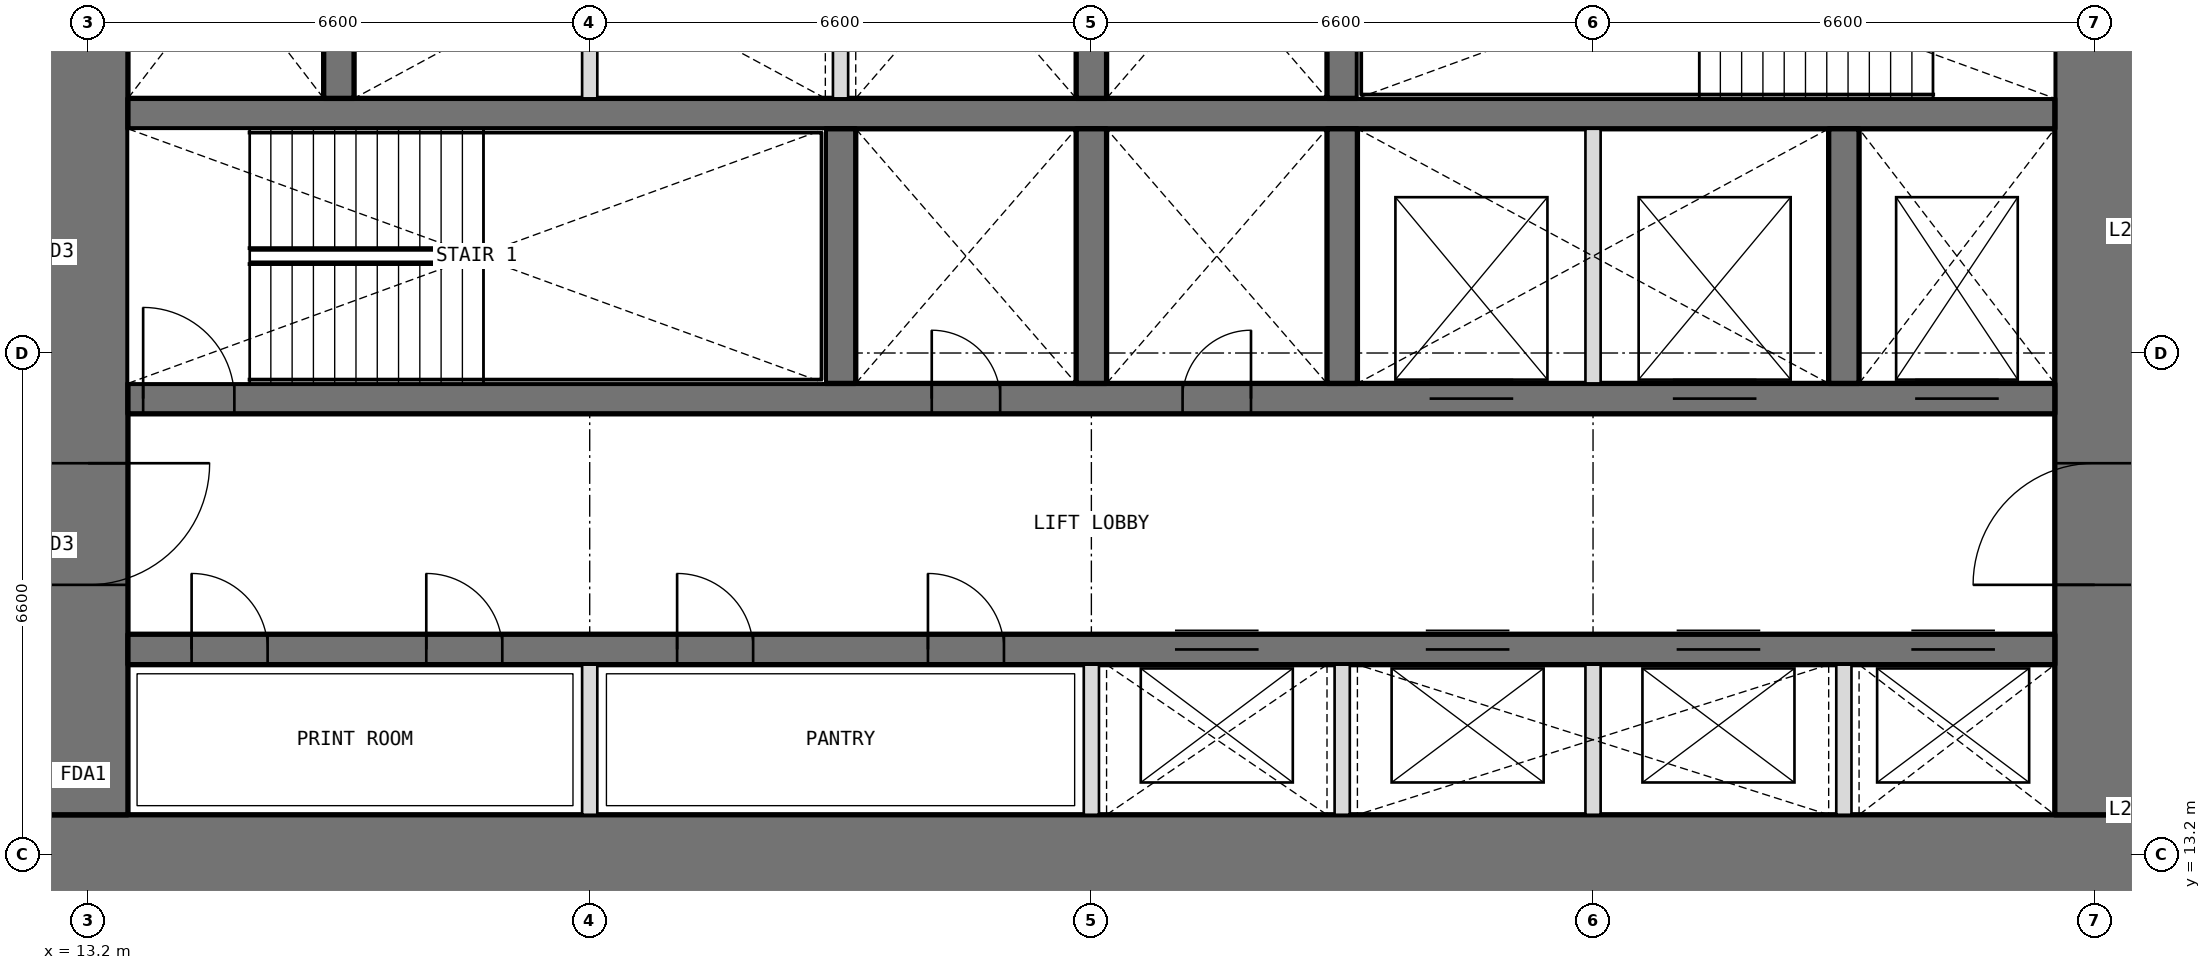
"""IFC4 building model, lengths in metres.
Left out: names, types, materials, properties, quantities, classifications, styles, units other than length and angle.
Written with IfcOpenShell. Run it as: python <this file> out.ifc"""

import sys

from ifc_helpers import new_model, si_unit, direction, frame, frame_2d, origin, place, context, subcontext, project, spatial, rectangle, extrude, element, fill, save


model = new_model("IFC4")
c1 = context("Model", 3, precision=1e-05, world=origin(), true_north=direction((0.0, 1.0)))
c2 = subcontext(c1, "Body", "Model", "MODEL_VIEW")
j1 = project(units=[si_unit("LENGTHUNIT", "METRE"), si_unit("PLANEANGLEUNIT", "RADIAN")], contexts=[c1])
p1 = place(None, origin())
s1 = spatial("IfcSite", under=j1, at=p1, CompositionType="ELEMENT")
p2 = place(p1, origin())
s2 = spatial("IfcBuilding", under=s1, at=p2, CompositionType="ELEMENT")
p3 = place(p2, frame((0.0, 0.0, 94.8)))
s3 = spatial("IfcBuildingStorey", under=s2, at=p3, CompositionType="ELEMENT", Elevation=94.8)
p4 = place(p3, frame((12.675, 13.2, 0.0), z_axis=(0.0, 0.0, 1.0), x_axis=(1.0, 0.0, 0.0)))
e1 = element("IfcWall", 1, at=p4, inside=s3, PredefinedType="SHEAR", context=c2, shape_type="SweptSolid", body=[
    extrude(rectangle(XDim=27.45, YDim=1.05, at=frame_2d((13.725, 0.0))), origin(), (0.0, 0.0, 1.0), 4.2),
])
p5 = place(p3, frame((39.6, 13.725, 0.0), z_axis=(0.0, 0.0, 1.0), x_axis=(0.0, 1.0, 0.0)))
e2 = element("IfcWall", 2, at=p5, inside=s3, PredefinedType="SHEAR", context=c2, shape_type="SweptSolid", body=[
    extrude(rectangle(XDim=18.75, YDim=1.05, at=frame_2d((9.375, 0.0))), origin(), (0.0, 0.0, 1.0), 4.2),
])
p6 = place(p5, frame((3.025, 0.0, 0.0)))
e3 = element("IfcOpeningElement", 3, at=p6, cuts=e2, PredefinedType="OPENING", context=c2, shape_type="SweptSolid", body=[
    extrude(rectangle(XDim=1.6, YDim=2.1, at=frame_2d((0.8, 1.05))), frame((0.0, 0.535, 0.0), z_axis=(0.0, -1.0, 0.0), x_axis=(1.0, 0.0, 0.0)), (0.0, 0.0, 1.0), 1.07),
])
p7 = place(p5, frame((13.825, 0.0, 0.0)))
e4 = element("IfcOpeningElement", 4, at=p7, cuts=e2, PredefinedType="OPENING", context=c2, shape_type="SweptSolid", body=[
    extrude(rectangle(XDim=1.6, YDim=2.1, at=frame_2d((0.8, 1.05))), frame((0.0, 0.535, 0.0), z_axis=(0.0, -1.0, 0.0), x_axis=(1.0, 0.0, 0.0)), (0.0, 0.0, 1.0), 1.07),
])
p8 = place(p3, frame((13.2, 32.475, 0.0), z_axis=(0.0, 0.0, 1.0), x_axis=(0.0, -1.0, 0.0)))
e5 = element("IfcWall", 5, at=p8, inside=s3, PredefinedType="SHEAR", context=c2, shape_type="SweptSolid", body=[
    extrude(rectangle(XDim=18.75, YDim=1.05, at=frame_2d((9.375, 0.0))), origin(), (0.0, 0.0, 1.0), 4.2),
])
p9 = place(p8, frame((14.125, 0.0, 0.0)))
e6 = element("IfcOpeningElement", 6, at=p9, cuts=e5, PredefinedType="OPENING", context=c2, shape_type="SweptSolid", body=[
    extrude(rectangle(XDim=1.6, YDim=2.1, at=frame_2d((0.8, 1.05))), frame((0.0, 0.535, 0.0), z_axis=(0.0, -1.0, 0.0), x_axis=(1.0, 0.0, 0.0)), (0.0, 0.0, 1.0), 1.07),
])
p10 = place(p8, frame((3.325, 0.0, 0.0)))
e7 = element("IfcOpeningElement", 7, at=p10, cuts=e5, PredefinedType="OPENING", context=c2, shape_type="SweptSolid", body=[
    extrude(rectangle(XDim=1.6, YDim=2.1, at=frame_2d((0.8, 1.05))), frame((0.0, 0.535, 0.0), z_axis=(0.0, -1.0, 0.0), x_axis=(1.0, 0.0, 0.0)), (0.0, 0.0, 1.0), 1.07),
])
p11 = place(p3, frame((13.725, 15.9, 0.0), z_axis=(0.0, 0.0, 1.0), x_axis=(1.0, 0.0, 0.0)))
e8 = element("IfcWall", 8, at=p11, inside=s3, PredefinedType="SHEAR", context=c2, shape_type="SweptSolid", body=[
    extrude(rectangle(XDim=25.35, YDim=0.4, at=frame_2d((12.675, 0.0))), origin(), (0.0, 0.0, 1.0), 4.2),
])
p12 = place(p11, frame((0.837, 0.0, 0.0)))
e9 = element("IfcOpeningElement", 9, at=p12, cuts=e8, PredefinedType="OPENING", context=c2, shape_type="SweptSolid", body=[
    extrude(rectangle(XDim=1.0, YDim=2.1, at=frame_2d((0.5, 1.05))), frame((0.0, 0.21, 0.0), z_axis=(0.0, -1.0, 0.0), x_axis=(1.0, 0.0, 0.0)), (0.0, 0.0, 1.0), 0.42),
])
p13 = place(p11, frame((3.925, 0.0, 0.0)))
e10 = element("IfcOpeningElement", 10, at=p13, cuts=e8, PredefinedType="OPENING", context=c2, shape_type="SweptSolid", body=[
    extrude(rectangle(XDim=1.0, YDim=2.1, at=frame_2d((0.5, 1.05))), frame((0.0, 0.21, 0.0), z_axis=(0.0, -1.0, 0.0), x_axis=(1.0, 0.0, 0.0)), (0.0, 0.0, 1.0), 0.42),
])
p14 = place(p11, frame((7.225, 0.0, 0.0)))
e11 = element("IfcOpeningElement", 11, at=p14, cuts=e8, PredefinedType="OPENING", context=c2, shape_type="SweptSolid", body=[
    extrude(rectangle(XDim=1.0, YDim=2.1, at=frame_2d((0.5, 1.05))), frame((0.0, 0.21, 0.0), z_axis=(0.0, -1.0, 0.0), x_axis=(1.0, 0.0, 0.0)), (0.0, 0.0, 1.0), 0.42),
])
p15 = place(p11, frame((10.525, 0.0, 0.0)))
e12 = element("IfcOpeningElement", 12, at=p15, cuts=e8, PredefinedType="OPENING", context=c2, shape_type="SweptSolid", body=[
    extrude(rectangle(XDim=1.0, YDim=2.1, at=frame_2d((0.5, 1.05))), frame((0.0, 0.21, 0.0), z_axis=(0.0, -1.0, 0.0), x_axis=(1.0, 0.0, 0.0)), (0.0, 0.0, 1.0), 0.42),
])
p16 = place(p11, frame((13.775, 0.0, 0.0)))
e13 = element("IfcOpeningElement", 13, at=p16, cuts=e8, PredefinedType="OPENING", context=c2, shape_type="SweptSolid", body=[
    extrude(rectangle(XDim=1.1, YDim=2.1, at=frame_2d((0.55, 1.05))), frame((0.0, 0.21, 0.0), z_axis=(0.0, -1.0, 0.0), x_axis=(1.0, 0.0, 0.0)), (0.0, 0.0, 1.0), 0.42),
])
p17 = place(p11, frame((17.075, 0.0, 0.0)))
e14 = element("IfcOpeningElement", 14, at=p17, cuts=e8, PredefinedType="OPENING", context=c2, shape_type="SweptSolid", body=[
    extrude(rectangle(XDim=1.1, YDim=2.1, at=frame_2d((0.55, 1.05))), frame((0.0, 0.21, 0.0), z_axis=(0.0, -1.0, 0.0), x_axis=(1.0, 0.0, 0.0)), (0.0, 0.0, 1.0), 0.42),
])
p18 = place(p11, frame((20.375, 0.0, 0.0)))
e15 = element("IfcOpeningElement", 15, at=p18, cuts=e8, PredefinedType="OPENING", context=c2, shape_type="SweptSolid", body=[
    extrude(rectangle(XDim=1.1, YDim=2.1, at=frame_2d((0.55, 1.05))), frame((0.0, 0.21, 0.0), z_axis=(0.0, -1.0, 0.0), x_axis=(1.0, 0.0, 0.0)), (0.0, 0.0, 1.0), 0.42),
])
p19 = place(p11, frame((23.462, 0.0, 0.0)))
e16 = element("IfcOpeningElement", 16, at=p19, cuts=e8, PredefinedType="OPENING", context=c2, shape_type="SweptSolid", body=[
    extrude(rectangle(XDim=1.1, YDim=2.1, at=frame_2d((0.55, 1.05))), frame((0.0, 0.21, 0.0), z_axis=(0.0, -1.0, 0.0), x_axis=(1.0, 0.0, 0.0)), (0.0, 0.0, 1.0), 0.42),
])
p20 = place(p3, frame((13.725, 19.2, 0.0), z_axis=(0.0, 0.0, 1.0), x_axis=(1.0, 0.0, 0.0)))
e17 = element("IfcWall", 17, at=p20, inside=s3, PredefinedType="SHEAR", context=c2, shape_type="SweptSolid", body=[
    extrude(rectangle(XDim=25.35, YDim=0.4, at=frame_2d((12.675, 0.0))), origin(), (0.0, 0.0, 1.0), 4.2),
])
p21 = place(p20, frame((10.575, 0.0, 0.0)))
e18 = element("IfcOpeningElement", 18, at=p21, cuts=e17, PredefinedType="OPENING", context=c2, shape_type="SweptSolid", body=[
    extrude(rectangle(XDim=0.9, YDim=2.1, at=frame_2d((0.45, 1.05))), frame((0.0, 0.21, 0.0), z_axis=(0.0, -1.0, 0.0), x_axis=(1.0, 0.0, 0.0)), (0.0, 0.0, 1.0), 0.42),
])
p22 = place(p20, frame((13.875, 0.0, 0.0)))
e19 = element("IfcOpeningElement", 19, at=p22, cuts=e17, PredefinedType="OPENING", context=c2, shape_type="SweptSolid", body=[
    extrude(rectangle(XDim=0.9, YDim=2.1, at=frame_2d((0.45, 1.05))), frame((0.0, 0.21, 0.0), z_axis=(0.0, -1.0, 0.0), x_axis=(1.0, 0.0, 0.0)), (0.0, 0.0, 1.0), 0.42),
])
p23 = place(p20, frame((0.2, 0.0, 0.0)))
e20 = element("IfcOpeningElement", 20, at=p23, cuts=e17, PredefinedType="OPENING", context=c2, shape_type="SweptSolid", body=[
    extrude(rectangle(XDim=1.2, YDim=2.1, at=frame_2d((0.6, 1.05))), frame((0.0, 0.21, 0.0), z_axis=(0.0, -1.0, 0.0), x_axis=(1.0, 0.0, 0.0)), (0.0, 0.0, 1.0), 0.42),
])
p24 = place(p20, frame((23.512, 0.0, 0.0)))
e21 = element("IfcOpeningElement", 21, at=p24, cuts=e17, PredefinedType="OPENING", context=c2, shape_type="SweptSolid", body=[
    extrude(rectangle(XDim=1.1, YDim=2.1, at=frame_2d((0.55, 1.05))), frame((0.0, 0.21, 0.0), z_axis=(0.0, -1.0, 0.0), x_axis=(1.0, 0.0, 0.0)), (0.0, 0.0, 1.0), 0.42),
])
p25 = place(p20, frame((17.125, 0.0, 0.0)))
e22 = element("IfcOpeningElement", 22, at=p25, cuts=e17, PredefinedType="OPENING", context=c2, shape_type="SweptSolid", body=[
    extrude(rectangle(XDim=1.1, YDim=2.1, at=frame_2d((0.55, 1.05))), frame((0.0, 0.21, 0.0), z_axis=(0.0, -1.0, 0.0), x_axis=(1.0, 0.0, 0.0)), (0.0, 0.0, 1.0), 0.42),
])
p26 = place(p20, frame((20.325, 0.0, 0.0)))
e23 = element("IfcOpeningElement", 23, at=p26, cuts=e17, PredefinedType="OPENING", context=c2, shape_type="SweptSolid", body=[
    extrude(rectangle(XDim=1.1, YDim=2.1, at=frame_2d((0.55, 1.05))), frame((0.0, 0.21, 0.0), z_axis=(0.0, -1.0, 0.0), x_axis=(1.0, 0.0, 0.0)), (0.0, 0.0, 1.0), 0.42),
])
p27 = place(p3, frame((13.725, 22.95, 0.0), z_axis=(0.0, 0.0, 1.0), x_axis=(1.0, 0.0, 0.0)))
e24 = element("IfcWall", 24, at=p27, inside=s3, PredefinedType="SHEAR", context=c2, shape_type="SweptSolid", body=[
    extrude(rectangle(XDim=25.35, YDim=0.4, at=frame_2d((12.675, 0.0))), origin(), (0.0, 0.0, 1.0), 4.2),
])
for number, where, z_axis, x_axis in (
    (25, (23.1, 19.4, 0.0), (0.0, 0.0, 1.0), (0.0, 1.0, 0.0)),
    (26, (26.4, 19.4, 0.0), (0.0, 0.0, 1.0), (0.0, 1.0, 0.0)),
    (27, (29.7, 19.4, 0.0), (0.0, 0.0, 1.0), (0.0, 1.0, 0.0)),
    (28, (36.3, 19.4, 0.0), (0.0, 0.0, 1.0), (0.0, 1.0, 0.0)),
    (29, (16.5, 23.15, 0.0), (0.0, 0.0, 1.0), (0.0, 1.0, 0.0)),
    (30, (26.4, 23.15, 0.0), (0.0, 0.0, 1.0), (0.0, 1.0, 0.0)),
    (31, (29.7, 23.15, 0.0), (0.0, 0.0, 1.0), (0.0, 1.0, 0.0)),
):
    element("IfcWall", number, at=place(p3, frame(where, z_axis=z_axis, x_axis=x_axis)), inside=s3, PredefinedType="SHEAR", context=c2, shape_type="SweptSolid", body=[
        extrude(rectangle(XDim=3.35, YDim=0.4, at=frame_2d((1.675, 0.0))), origin(), (0.0, 0.0, 1.0), 4.2),
    ])
for number, where, z_axis, x_axis in (
    (32, (19.8, 13.725, 0.0), (0.0, 0.0, 1.0), (0.0, 1.0, 0.0)),
    (33, (26.4, 13.725, 0.0), (0.0, 0.0, 1.0), (0.0, 1.0, 0.0)),
    (34, (29.7, 13.725, 0.0), (0.0, 0.0, 1.0), (0.0, 1.0, 0.0)),
    (35, (33.0, 13.725, 0.0), (0.0, 0.0, 1.0), (0.0, 1.0, 0.0)),
    (36, (36.3, 13.725, 0.0), (0.0, 0.0, 1.0), (0.0, 1.0, 0.0)),
):
    element("IfcWall", number, at=place(p3, frame(where, z_axis=z_axis, x_axis=x_axis)), inside=s3, PredefinedType="PARTITIONING", context=c2, shape_type="SweptSolid", body=[
        extrude(rectangle(XDim=1.975, YDim=0.2, at=frame_2d((0.987, 0.0))), origin(), (0.0, 0.0, 1.0), 4.2),
    ])
for number, where, z_axis, x_axis in (
    (37, (33.0, 19.4, 0.0), (0.0, 0.0, 1.0), (0.0, 1.0, 0.0)),
    (38, (19.8, 23.15, 0.0), (0.0, 0.0, 1.0), (0.0, 1.0, 0.0)),
    (39, (23.1, 23.15, 0.0), (0.0, 0.0, 1.0), (0.0, 1.0, 0.0)),
):
    element("IfcWall", number, at=place(p3, frame(where, z_axis=z_axis, x_axis=x_axis)), inside=s3, PredefinedType="PARTITIONING", context=c2, shape_type="SweptSolid", body=[
        extrude(rectangle(XDim=3.35, YDim=0.2, at=frame_2d((1.675, 0.0))), origin(), (0.0, 0.0, 1.0), 4.2),
    ])
p28 = place(p21, origin())
e40 = element("IfcDoor", 40, at=p28, inside=s3, OperationType="SINGLE_SWING_LEFT", PredefinedType="DOOR", context=c2, shape_type="SweptSolid", body=[
    extrude(rectangle(XDim=0.9, YDim=2.1, at=frame_2d((0.45, 1.05))), frame((0.0, 0.025, 0.0), z_axis=(0.0, -1.0, 0.0), x_axis=(1.0, 0.0, 0.0)), (0.0, 0.0, 1.0), 0.05),
])
fill(e18, e40)
p29 = place(p22, origin())
e41 = element("IfcDoor", 41, at=p29, inside=s3, OperationType="SINGLE_SWING_RIGHT", PredefinedType="DOOR", context=c2, shape_type="SweptSolid", body=[
    extrude(rectangle(XDim=0.9, YDim=2.1, at=frame_2d((0.45, 1.05))), frame((0.0, 0.025, 0.0), z_axis=(0.0, -1.0, 0.0), x_axis=(1.0, 0.0, 0.0)), (0.0, 0.0, 1.0), 0.05),
])
fill(e19, e41)
p30 = place(p12, origin())
e42 = element("IfcDoor", 42, at=p30, inside=s3, OperationType="SINGLE_SWING_LEFT", PredefinedType="DOOR", context=c2, shape_type="SweptSolid", body=[
    extrude(rectangle(XDim=1.0, YDim=2.1, at=frame_2d((0.5, 1.05))), frame((0.0, 0.025, 0.0), z_axis=(0.0, -1.0, 0.0), x_axis=(1.0, 0.0, 0.0)), (0.0, 0.0, 1.0), 0.05),
])
fill(e9, e42)
p31 = place(p13, origin())
e43 = element("IfcDoor", 43, at=p31, inside=s3, OperationType="SINGLE_SWING_LEFT", PredefinedType="DOOR", context=c2, shape_type="SweptSolid", body=[
    extrude(rectangle(XDim=1.0, YDim=2.1, at=frame_2d((0.5, 1.05))), frame((0.0, 0.025, 0.0), z_axis=(0.0, -1.0, 0.0), x_axis=(1.0, 0.0, 0.0)), (0.0, 0.0, 1.0), 0.05),
])
fill(e10, e43)
p32 = place(p14, origin())
e44 = element("IfcDoor", 44, at=p32, inside=s3, OperationType="SINGLE_SWING_LEFT", PredefinedType="DOOR", context=c2, shape_type="SweptSolid", body=[
    extrude(rectangle(XDim=1.0, YDim=2.1, at=frame_2d((0.5, 1.05))), frame((0.0, 0.025, 0.0), z_axis=(0.0, -1.0, 0.0), x_axis=(1.0, 0.0, 0.0)), (0.0, 0.0, 1.0), 0.05),
])
fill(e11, e44)
p33 = place(p15, origin())
e45 = element("IfcDoor", 45, at=p33, inside=s3, OperationType="SINGLE_SWING_LEFT", PredefinedType="DOOR", context=c2, shape_type="SweptSolid", body=[
    extrude(rectangle(XDim=1.0, YDim=2.1, at=frame_2d((0.5, 1.05))), frame((0.0, 0.025, 0.0), z_axis=(0.0, -1.0, 0.0), x_axis=(1.0, 0.0, 0.0)), (0.0, 0.0, 1.0), 0.05),
])
fill(e12, e45)
p34 = place(p23, origin())
e46 = element("IfcDoor", 46, at=p34, inside=s3, OperationType="SINGLE_SWING_LEFT", PredefinedType="DOOR", context=c2, shape_type="SweptSolid", body=[
    extrude(rectangle(XDim=1.2, YDim=2.1, at=frame_2d((0.6, 1.05))), frame((0.0, 0.025, 0.0), z_axis=(0.0, -1.0, 0.0), x_axis=(1.0, 0.0, 0.0)), (0.0, 0.0, 1.0), 0.05),
])
fill(e20, e46)
p35 = place(p9, origin())
e47 = element("IfcDoor", 47, at=p35, inside=s3, OperationType="DOUBLE_DOOR_DOUBLE_SWING", PredefinedType="DOOR", context=c2, shape_type="SweptSolid", body=[
    extrude(rectangle(XDim=1.6, YDim=2.1, at=frame_2d((0.8, 1.05))), frame((0.0, 0.025, 0.0), z_axis=(0.0, -1.0, 0.0), x_axis=(1.0, 0.0, 0.0)), (0.0, 0.0, 1.0), 0.05),
])
fill(e6, e47)
p36 = place(p6, origin())
e48 = element("IfcDoor", 48, at=p36, inside=s3, OperationType="DOUBLE_DOOR_DOUBLE_SWING", PredefinedType="DOOR", context=c2, shape_type="SweptSolid", body=[
    extrude(rectangle(XDim=1.6, YDim=2.1, at=frame_2d((0.8, 1.05))), frame((0.0, 0.025, 0.0), z_axis=(0.0, -1.0, 0.0), x_axis=(1.0, 0.0, 0.0)), (0.0, 0.0, 1.0), 0.05),
])
fill(e3, e48)
p37 = place(p16, origin())
e49 = element("IfcDoor", 49, at=p37, inside=s3, OperationType="DOUBLE_DOOR_SLIDING", PredefinedType="DOOR", context=c2, shape_type="SweptSolid", body=[
    extrude(rectangle(XDim=1.1, YDim=2.1, at=frame_2d((0.55, 1.05))), frame((0.0, 0.025, 0.0), z_axis=(0.0, -1.0, 0.0), x_axis=(1.0, 0.0, 0.0)), (0.0, 0.0, 1.0), 0.05),
])
fill(e13, e49)
p38 = place(p17, origin())
e50 = element("IfcDoor", 50, at=p38, inside=s3, OperationType="DOUBLE_DOOR_SLIDING", PredefinedType="DOOR", context=c2, shape_type="SweptSolid", body=[
    extrude(rectangle(XDim=1.1, YDim=2.1, at=frame_2d((0.55, 1.05))), frame((0.0, 0.025, 0.0), z_axis=(0.0, -1.0, 0.0), x_axis=(1.0, 0.0, 0.0)), (0.0, 0.0, 1.0), 0.05),
])
fill(e14, e50)
p39 = place(p18, origin())
e51 = element("IfcDoor", 51, at=p39, inside=s3, OperationType="DOUBLE_DOOR_SLIDING", PredefinedType="DOOR", context=c2, shape_type="SweptSolid", body=[
    extrude(rectangle(XDim=1.1, YDim=2.1, at=frame_2d((0.55, 1.05))), frame((0.0, 0.025, 0.0), z_axis=(0.0, -1.0, 0.0), x_axis=(1.0, 0.0, 0.0)), (0.0, 0.0, 1.0), 0.05),
])
fill(e15, e51)
p40 = place(p19, origin())
e52 = element("IfcDoor", 52, at=p40, inside=s3, OperationType="DOUBLE_DOOR_SLIDING", PredefinedType="DOOR", context=c2, shape_type="SweptSolid", body=[
    extrude(rectangle(XDim=1.1, YDim=2.1, at=frame_2d((0.55, 1.05))), frame((0.0, 0.025, 0.0), z_axis=(0.0, -1.0, 0.0), x_axis=(1.0, 0.0, 0.0)), (0.0, 0.0, 1.0), 0.05),
])
fill(e16, e52)
p41 = place(p24, origin())
e53 = element("IfcDoor", 53, at=p41, inside=s3, OperationType="DOUBLE_DOOR_SLIDING", PredefinedType="DOOR", context=c2, shape_type="SweptSolid", body=[
    extrude(rectangle(XDim=1.1, YDim=2.1, at=frame_2d((0.55, 1.05))), frame((0.0, 0.025, 0.0), z_axis=(0.0, -1.0, 0.0), x_axis=(1.0, 0.0, 0.0)), (0.0, 0.0, 1.0), 0.05),
])
fill(e21, e53)
p42 = place(p25, origin())
e54 = element("IfcDoor", 54, at=p42, inside=s3, OperationType="DOUBLE_DOOR_SLIDING", PredefinedType="DOOR", context=c2, shape_type="SweptSolid", body=[
    extrude(rectangle(XDim=1.1, YDim=2.1, at=frame_2d((0.55, 1.05))), frame((0.0, 0.025, 0.0), z_axis=(0.0, -1.0, 0.0), x_axis=(1.0, 0.0, 0.0)), (0.0, 0.0, 1.0), 0.05),
])
fill(e22, e54)
p43 = place(p26, origin())
e55 = element("IfcDoor", 55, at=p43, inside=s3, OperationType="DOUBLE_DOOR_SLIDING", PredefinedType="DOOR", context=c2, shape_type="SweptSolid", body=[
    extrude(rectangle(XDim=1.1, YDim=2.1, at=frame_2d((0.55, 1.05))), frame((0.0, 0.025, 0.0), z_axis=(0.0, -1.0, 0.0), x_axis=(1.0, 0.0, 0.0)), (0.0, 0.0, 1.0), 0.05),
])
fill(e23, e55)
save(model, sys.argv[1])
